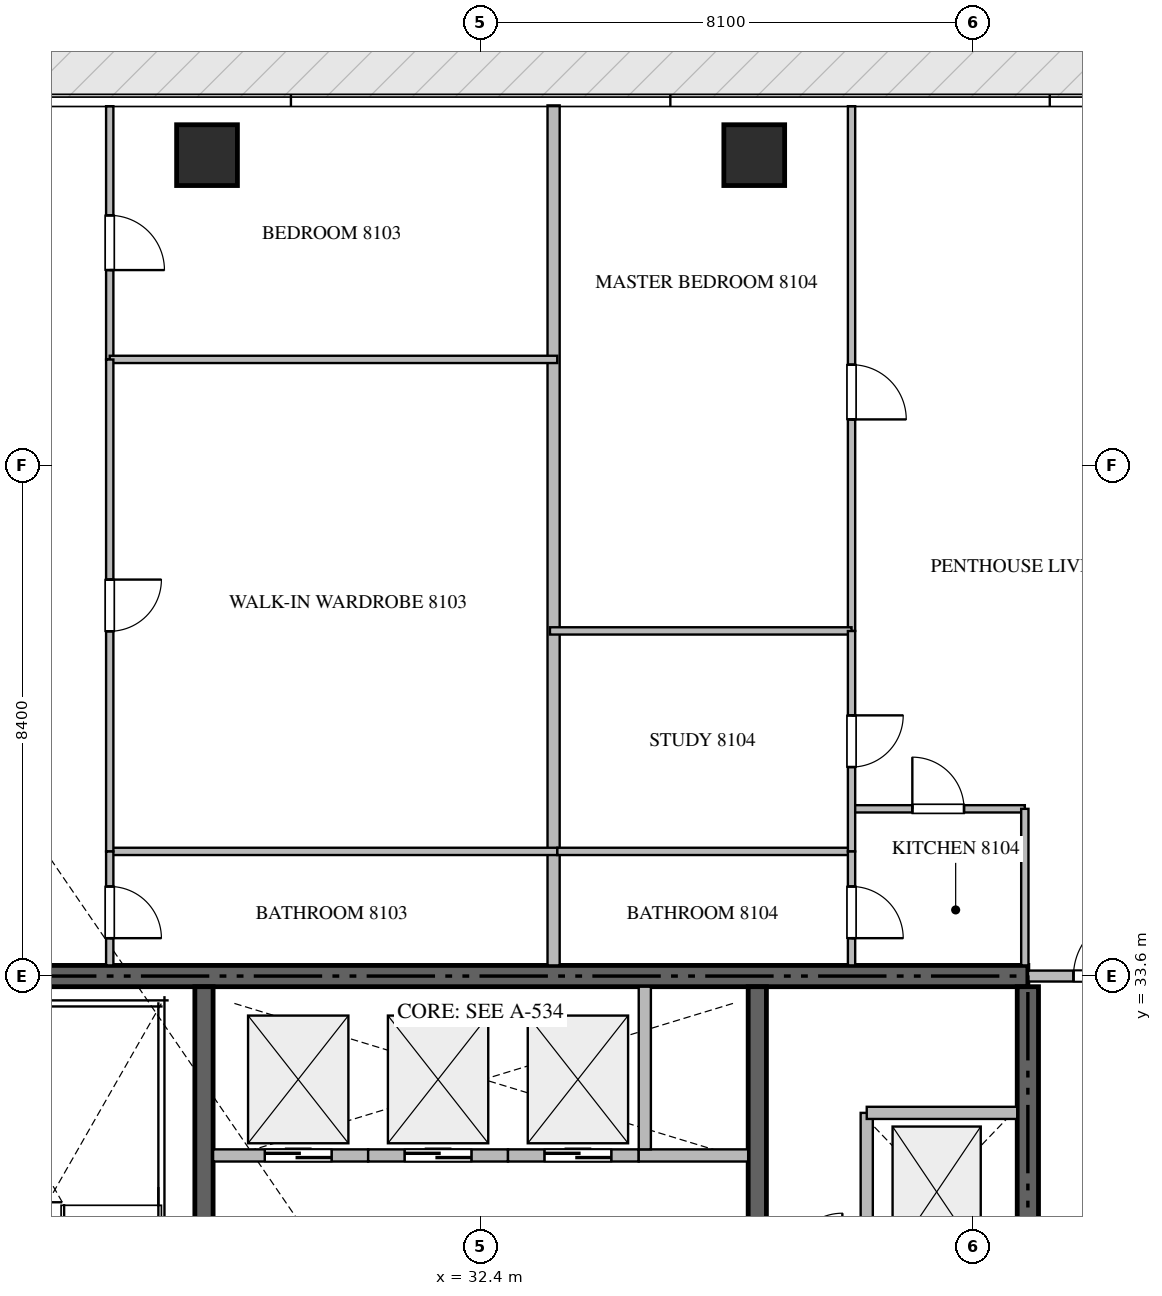
"""IFC4 building model, lengths in metres.
Left out: names, types, materials, properties, quantities, classifications, styles, units other than length and angle.
Written with IfcOpenShell. Run it as: python <this file> out.ifc"""

import sys

from ifc_helpers import new_model, si_unit, direction, frame, frame_2d, origin, origin_2d, place, context, subcontext, project, spatial, rectangle, extrude, source, transform, mapped, element, fill, save


model = new_model("IFC4")
c1 = context("Model", 3, precision=1e-05, world=origin(), true_north=direction((0.0, 1.0)))
c2 = subcontext(c1, "Body", "Model", "MODEL_VIEW")
j1 = project(units=[si_unit("LENGTHUNIT", "METRE"), si_unit("PLANEANGLEUNIT", "RADIAN")], contexts=[c1])
p1 = place(None, origin())
s1 = spatial("IfcSite", under=j1, at=p1, CompositionType="ELEMENT")
p2 = place(p1, origin())
s2 = spatial("IfcBuilding", under=s1, at=p2, CompositionType="ELEMENT")
p3 = place(p2, frame((0.0, 0.0, 325.85)))
s3 = spatial("IfcBuildingStorey", under=s2, at=p3, CompositionType="ELEMENT", Elevation=325.85)
p4 = place(p3, frame((41.4, 33.6, -0.26), z_axis=(0.0, 0.0, 1.0), x_axis=(-1.0, 0.0, 0.0)))
e1 = element("IfcWall", 1, at=p4, inside=s3, PredefinedType="SHEAR", context=c2, shape_type="SweptSolid", body=[
    extrude(rectangle(XDim=18.0, YDim=0.35, at=frame_2d((9.0, 0.0))), origin(), (0.0, 0.0, 1.0), 4.048),
])
p5 = place(p3, frame((41.4, 27.75, -0.26), z_axis=(0.0, 0.0, 1.0), x_axis=(0.0, 1.0, 0.0)))
e2 = element("IfcWall", 2, at=p5, inside=s3, PredefinedType="SHEAR", context=c2, shape_type="SweptSolid", body=[
    extrude(rectangle(XDim=5.675, YDim=0.35, at=frame_2d((2.837, 0.0))), origin(), (0.0, 0.0, 1.0), 4.048),
])
p6 = place(p3, frame((27.85, 23.55, -0.26), z_axis=(0.0, 0.0, 1.0), x_axis=(0.0, 1.0, 0.0)))
e3 = element("IfcWall", 3, at=p6, inside=s3, PredefinedType="SHEAR", context=c2, shape_type="SweptSolid", body=[
    extrude(rectangle(XDim=9.875, YDim=0.3, at=frame_2d((4.938, 0.0))), origin(), (0.0, 0.0, 1.0), 4.048),
])
p7 = place(p3, frame((36.95, 27.05, -0.26), z_axis=(0.0, 0.0, 1.0), x_axis=(0.0, 1.0, 0.0)))
e4 = element("IfcWall", 4, at=p7, inside=s3, PredefinedType="SHEAR", context=c2, shape_type="SweptSolid", body=[
    extrude(rectangle(XDim=6.375, YDim=0.3, at=frame_2d((3.188, 0.0))), origin(), (0.0, 0.0, 1.0), 4.048),
])
m1 = source(origin(), c2, "Body", "SweptSolid", [
    extrude(rectangle(XDim=1.0, YDim=1.0, at=origin_2d()), origin(), (0.0, 0.0, 1.0), 4.05),
])
for number, where, z_axis, x_axis in (
    (5, (27.9, 47.1, -0.26), (0.0, 0.0, 1.0), (1.0, 0.0, 0.0)),
    (6, (36.9, 47.1, -0.26), (0.0, 0.0, 1.0), (1.0, 0.0, 0.0)),
):
    element("IfcColumn", number, at=place(p3, frame(where, z_axis=z_axis, x_axis=x_axis)), inside=s3, PredefinedType="COLUMN", context=c2, shape_type="MappedRepresentation", body=[
        mapped(m1, transform((0.0, 0.0, 0.0), scale=1.0)),
    ])
p8 = place(p3, frame((28.0, 30.65, 0.0), z_axis=(0.0, 0.0, 1.0), x_axis=(1.0, 0.0, 0.0)))
e7 = element("IfcWall", 7, at=p8, inside=s3, PredefinedType="STANDARD", context=c2, shape_type="SweptSolid", body=[
    extrude(rectangle(XDim=2.55, YDim=0.2, at=frame_2d((1.275, 0.0))), origin(), (0.0, 0.0, 1.0), 3.79),
])
p9 = place(p8, frame((0.85, 0.0, 0.0)))
e8 = element("IfcOpeningElement", 8, at=p9, cuts=e7, PredefinedType="OPENING", context=c2, shape_type="SweptSolid", body=[
    extrude(rectangle(XDim=1.1, YDim=2.2, at=frame_2d((0.55, 1.1))), frame((0.0, 0.11, 0.0), z_axis=(0.0, -1.0, 0.0), x_axis=(1.0, 0.0, 0.0)), (0.0, 0.0, 1.0), 0.22),
])
p10 = place(p3, frame((30.55, 30.65, 0.0), z_axis=(0.0, 0.0, 1.0), x_axis=(1.0, 0.0, 0.0)))
e9 = element("IfcWall", 9, at=p10, inside=s3, PredefinedType="STANDARD", context=c2, shape_type="SweptSolid", body=[
    extrude(rectangle(XDim=2.3, YDim=0.2, at=frame_2d((1.15, 0.0))), origin(), (0.0, 0.0, 1.0), 3.79),
])
p11 = place(p10, frame((0.6, 0.0, 0.0)))
e10 = element("IfcOpeningElement", 10, at=p11, cuts=e9, PredefinedType="OPENING", context=c2, shape_type="SweptSolid", body=[
    extrude(rectangle(XDim=1.1, YDim=2.2, at=frame_2d((0.55, 1.1))), frame((0.0, 0.11, 0.0), z_axis=(0.0, -1.0, 0.0), x_axis=(1.0, 0.0, 0.0)), (0.0, 0.0, 1.0), 0.22),
])
p12 = place(p3, frame((32.85, 30.65, 0.0), z_axis=(0.0, 0.0, 1.0), x_axis=(1.0, 0.0, 0.0)))
e11 = element("IfcWall", 11, at=p12, inside=s3, PredefinedType="STANDARD", context=c2, shape_type="SweptSolid", body=[
    extrude(rectangle(XDim=2.15, YDim=0.2, at=frame_2d((1.075, 0.0))), origin(), (0.0, 0.0, 1.0), 3.79),
])
p13 = place(p12, frame((0.6, 0.0, 0.0)))
e12 = element("IfcOpeningElement", 12, at=p13, cuts=e11, PredefinedType="OPENING", context=c2, shape_type="SweptSolid", body=[
    extrude(rectangle(XDim=1.1, YDim=2.2, at=frame_2d((0.55, 1.1))), frame((0.0, 0.11, 0.0), z_axis=(0.0, -1.0, 0.0), x_axis=(1.0, 0.0, 0.0)), (0.0, 0.0, 1.0), 0.22),
])
p14 = place(p3, frame((35.0, 30.65, 0.0), z_axis=(0.0, 0.0, 1.0), x_axis=(1.0, 0.0, 0.0)))
e13 = element("IfcWall", 13, at=p14, inside=s3, PredefinedType="STANDARD", context=c2, shape_type="SweptSolid", body=[
    extrude(rectangle(XDim=1.8, YDim=0.2, at=frame_2d((0.9, 0.0))), origin(), (0.0, 0.0, 1.0), 3.79),
])
p15 = place(p3, frame((35.1, 30.75, 0.0), z_axis=(0.0, 0.0, 1.0), x_axis=(0.0, 1.0, 0.0)))
e14 = element("IfcWall", 14, at=p15, inside=s3, PredefinedType="STANDARD", context=c2, shape_type="SweptSolid", body=[
    extrude(rectangle(XDim=2.675, YDim=0.2, at=frame_2d((1.337, 0.0))), origin(), (0.0, 0.0, 1.0), 3.79),
])
p16 = place(p3, frame((38.75, 28.85, 0.0), z_axis=(0.0, 0.0, 1.0), x_axis=(0.0, 1.0, 0.0)))
e15 = element("IfcWall", 15, at=p16, inside=s3, PredefinedType="STANDARD", context=c2, shape_type="SweptSolid", body=[
    extrude(rectangle(XDim=2.5, YDim=0.2, at=frame_2d((1.25, 0.0))), origin(), (0.0, 0.0, 1.0), 3.79),
])
p17 = place(p3, frame((38.75, 31.35, 0.0), z_axis=(0.0, 0.0, 1.0), x_axis=(1.0, 0.0, 0.0)))
e16 = element("IfcWall", 16, at=p17, inside=s3, PredefinedType="STANDARD", context=c2, shape_type="SweptSolid", body=[
    extrude(rectangle(XDim=2.475, YDim=0.2, at=frame_2d((1.238, 0.0))), origin(), (0.0, 0.0, 1.0), 3.79),
])
p18 = place(p3, frame((33.6, 33.775, 0.0), z_axis=(0.0, 0.0, 1.0), x_axis=(0.0, 1.0, 0.0)))
e17 = element("IfcWall", 17, at=p18, inside=s3, PredefinedType="PARTITIONING", context=c2, shape_type="SweptSolid", body=[
    extrude(rectangle(XDim=14.143, YDim=0.2, at=frame_2d((7.072, 0.0))), origin(), (0.0, 0.0, 1.0), 3.79),
])
p19 = place(p3, frame((41.402, 33.6, 0.0), z_axis=(0.0, 0.0, 1.0), x_axis=(1.0, 0.0, 0.0)))
e18 = element("IfcWall", 18, at=p19, inside=s3, PredefinedType="PARTITIONING", context=c2, shape_type="SweptSolid", body=[
    extrude(rectangle(XDim=2.496, YDim=0.18, at=frame_2d((1.248, 0.0))), origin(), (0.0, 0.0, 1.0), 3.79),
])
p20 = place(p19, frame((0.748, 0.0, 0.0)))
e19 = element("IfcOpeningElement", 19, at=p20, cuts=e18, PredefinedType="OPENING", context=c2, shape_type="SweptSolid", body=[
    extrude(rectangle(XDim=1.0, YDim=2.15, at=frame_2d((0.5, 1.075))), frame((0.0, 0.1, 0.0), z_axis=(0.0, -1.0, 0.0), x_axis=(1.0, 0.0, 0.0)), (0.0, 0.0, 1.0), 0.2),
])
p21 = place(p3, frame((26.3, 47.905, 0.0), z_axis=(0.0, 0.0, 1.0), x_axis=(0.0, -1.0, 0.0)))
e20 = element("IfcWall", 20, at=p21, inside=s3, PredefinedType="PARTITIONING", context=c2, shape_type="SweptSolid", body=[
    extrude(rectangle(XDim=4.164, YDim=0.12, at=frame_2d((2.082, 0.0))), origin(), (0.0, 0.0, 1.0), 3.79),
])
p22 = place(p21, frame((1.795, 0.0, 0.0)))
e21 = element("IfcOpeningElement", 21, at=p22, cuts=e20, PredefinedType="OPENING", context=c2, shape_type="SweptSolid", body=[
    extrude(rectangle(XDim=0.9, YDim=2.1, at=frame_2d((0.45, 1.05))), frame((0.0, 0.07, 0.0), z_axis=(0.0, -1.0, 0.0), x_axis=(1.0, 0.0, 0.0)), (0.0, 0.0, 1.0), 0.14),
])
for number, where, z_axis, x_axis in (
    (22, (26.3, 43.741, 0.0), (0.0, 0.0, 1.0), (1.0, 0.0, 0.0)),
    (23, (26.3, 35.65, 0.0), (0.0, 0.0, 1.0), (1.0, 0.0, 0.0)),
):
    element("IfcWall", number, at=place(p3, frame(where, z_axis=z_axis, x_axis=x_axis)), inside=s3, PredefinedType="PARTITIONING", context=c2, shape_type="SweptSolid", body=[
        extrude(rectangle(XDim=7.36, YDim=0.12, at=frame_2d((3.68, 0.0))), origin(), (0.0, 0.0, 1.0), 3.79),
    ])
p23 = place(p3, frame((26.3, 43.739, 0.0), z_axis=(0.0, 0.0, 1.0), x_axis=(0.0, -1.0, 0.0)))
e24 = element("IfcWall", 24, at=p23, inside=s3, PredefinedType="PARTITIONING", context=c2, shape_type="SweptSolid", body=[
    extrude(rectangle(XDim=8.089, YDim=0.12, at=frame_2d((4.044, 0.0))), origin(), (0.0, 0.0, 1.0), 3.79),
])
p24 = place(p23, frame((3.619, 0.0, 0.0)))
e25 = element("IfcOpeningElement", 25, at=p24, cuts=e24, PredefinedType="OPENING", context=c2, shape_type="SweptSolid", body=[
    extrude(rectangle(XDim=0.85, YDim=2.1, at=frame_2d((0.425, 1.05))), frame((0.0, 0.07, 0.0), z_axis=(0.0, -1.0, 0.0), x_axis=(1.0, 0.0, 0.0)), (0.0, 0.0, 1.0), 0.14),
])
p25 = place(p3, frame((26.3, 35.648, 0.0), z_axis=(0.0, 0.0, 1.0), x_axis=(0.0, -1.0, 0.0)))
e26 = element("IfcWall", 26, at=p25, inside=s3, PredefinedType="PARTITIONING", context=c2, shape_type="SweptSolid", body=[
    extrude(rectangle(XDim=1.873, YDim=0.12, at=frame_2d((0.937, 0.0))), origin(), (0.0, 0.0, 1.0), 3.79),
])
p26 = place(p25, frame((0.575, 0.0, 0.0)))
e27 = element("IfcOpeningElement", 27, at=p26, cuts=e26, PredefinedType="OPENING", context=c2, shape_type="SweptSolid", body=[
    extrude(rectangle(XDim=0.85, YDim=2.1, at=frame_2d((0.425, 1.05))), frame((0.0, 0.07, 0.0), z_axis=(0.0, -1.0, 0.0), x_axis=(1.0, 0.0, 0.0)), (0.0, 0.0, 1.0), 0.14),
])
p27 = place(p3, frame((38.5, 36.35, 0.0), z_axis=(0.0, 0.0, 1.0), x_axis=(1.0, 0.0, 0.0)))
e28 = element("IfcWall", 28, at=p27, inside=s3, PredefinedType="PARTITIONING", context=c2, shape_type="SweptSolid", body=[
    extrude(rectangle(XDim=2.85, YDim=0.12, at=frame_2d((1.425, 0.0))), origin(), (0.0, 0.0, 1.0), 3.512),
])
p28 = place(p27, frame((1.0, 0.0, 0.0)))
e29 = element("IfcOpeningElement", 29, at=p28, cuts=e28, PredefinedType="OPENING", context=c2, shape_type="SweptSolid", body=[
    extrude(rectangle(XDim=0.85, YDim=2.1, at=frame_2d((0.425, 1.05))), frame((0.0, 0.07, 0.0), z_axis=(0.0, -1.0, 0.0), x_axis=(1.0, 0.0, 0.0)), (0.0, 0.0, 1.0), 0.14),
])
p29 = place(p3, frame((41.35, 36.35, 0.0), z_axis=(0.0, 0.0, 1.0), x_axis=(0.0, -1.0, 0.0)))
e30 = element("IfcWall", 30, at=p29, inside=s3, PredefinedType="PARTITIONING", context=c2, shape_type="SweptSolid", body=[
    extrude(rectangle(XDim=2.575, YDim=0.12, at=frame_2d((1.288, 0.0))), origin(), (0.0, 0.0, 1.0), 3.79),
])
p30 = place(p3, frame((38.5, 47.905, 0.0), z_axis=(0.0, 0.0, 1.0), x_axis=(0.0, -1.0, 0.0)))
e31 = element("IfcWall", 31, at=p30, inside=s3, PredefinedType="PARTITIONING", context=c2, shape_type="SweptSolid", body=[
    extrude(rectangle(XDim=8.629, YDim=0.12, at=frame_2d((4.314, 0.0))), origin(), (0.0, 0.0, 1.0), 3.79),
])
p31 = place(p30, frame((4.251, 0.0, 0.0)))
e32 = element("IfcOpeningElement", 32, at=p31, cuts=e31, PredefinedType="OPENING", context=c2, shape_type="SweptSolid", body=[
    extrude(rectangle(XDim=0.9, YDim=2.1, at=frame_2d((0.45, 1.05))), frame((0.0, 0.07, 0.0), z_axis=(0.0, -1.0, 0.0), x_axis=(1.0, 0.0, 0.0)), (0.0, 0.0, 1.0), 0.14),
])
p32 = place(p3, frame((33.54, 39.276, 0.0), z_axis=(0.0, 0.0, 1.0), x_axis=(1.0, 0.0, 0.0)))
e33 = element("IfcWall", 33, at=p32, inside=s3, PredefinedType="PARTITIONING", context=c2, shape_type="SweptSolid", body=[
    extrude(rectangle(XDim=4.96, YDim=0.12, at=frame_2d((2.48, 0.0))), origin(), (0.0, 0.0, 1.0), 3.79),
])
p33 = place(p3, frame((33.662, 35.65, 0.0), z_axis=(0.0, 0.0, 1.0), x_axis=(1.0, 0.0, 0.0)))
e34 = element("IfcWall", 34, at=p33, inside=s3, PredefinedType="PARTITIONING", context=c2, shape_type="SweptSolid", body=[
    extrude(rectangle(XDim=4.838, YDim=0.12, at=frame_2d((2.419, 0.0))), origin(), (0.0, 0.0, 1.0), 3.79),
])
p34 = place(p3, frame((38.5, 39.274, 0.0), z_axis=(0.0, 0.0, 1.0), x_axis=(0.0, -1.0, 0.0)))
e35 = element("IfcWall", 35, at=p34, inside=s3, PredefinedType="PARTITIONING", context=c2, shape_type="SweptSolid", body=[
    extrude(rectangle(XDim=3.624, YDim=0.12, at=frame_2d((1.812, 0.0))), origin(), (0.0, 0.0, 1.0), 3.79),
])
p35 = place(p34, frame((1.387, 0.0, 0.0)))
e36 = element("IfcOpeningElement", 36, at=p35, cuts=e35, PredefinedType="OPENING", context=c2, shape_type="SweptSolid", body=[
    extrude(rectangle(XDim=0.85, YDim=2.1, at=frame_2d((0.425, 1.05))), frame((0.0, 0.07, 0.0), z_axis=(0.0, -1.0, 0.0), x_axis=(1.0, 0.0, 0.0)), (0.0, 0.0, 1.0), 0.14),
])
p36 = place(p3, frame((38.5, 35.648, 0.0), z_axis=(0.0, 0.0, 1.0), x_axis=(0.0, -1.0, 0.0)))
e37 = element("IfcWall", 37, at=p36, inside=s3, PredefinedType="PARTITIONING", context=c2, shape_type="SweptSolid", body=[
    extrude(rectangle(XDim=1.873, YDim=0.12, at=frame_2d((0.937, 0.0))), origin(), (0.0, 0.0, 1.0), 3.79),
])
p37 = place(p36, frame((0.575, 0.0, 0.0)))
e38 = element("IfcOpeningElement", 38, at=p37, cuts=e37, PredefinedType="OPENING", context=c2, shape_type="SweptSolid", body=[
    extrude(rectangle(XDim=0.85, YDim=2.1, at=frame_2d((0.425, 1.05))), frame((0.0, 0.07, 0.0), z_axis=(0.0, -1.0, 0.0), x_axis=(1.0, 0.0, 0.0)), (0.0, 0.0, 1.0), 0.14),
])
m2 = source(origin(), c2, "Body", "SweptSolid", [
    extrude(rectangle(XDim=1.1, YDim=2.2, at=frame_2d((0.55, 1.1))), frame((0.0, 0.025, 0.0), z_axis=(0.0, -1.0, 0.0), x_axis=(1.0, 0.0, 0.0)), (0.0, 0.0, 1.0), 0.05),
])
p38 = place(p9, origin())
e39 = element("IfcDoor", 39, at=p38, inside=s3, OperationType="DOUBLE_DOOR_SLIDING", PredefinedType="DOOR", context=c2, shape_type="MappedRepresentation", body=[
    mapped(m2, transform((0.0, 0.0, 0.0), scale=1.0)),
])
fill(e8, e39)
p39 = place(p11, origin())
e40 = element("IfcDoor", 40, at=p39, inside=s3, OperationType="DOUBLE_DOOR_SLIDING", PredefinedType="DOOR", context=c2, shape_type="MappedRepresentation", body=[
    mapped(m2, transform((0.0, 0.0, 0.0), scale=1.0)),
])
fill(e10, e40)
p40 = place(p13, origin())
e41 = element("IfcDoor", 41, at=p40, inside=s3, OperationType="DOUBLE_DOOR_SLIDING", PredefinedType="DOOR", context=c2, shape_type="MappedRepresentation", body=[
    mapped(m2, transform((0.0, 0.0, 0.0), scale=1.0)),
])
fill(e12, e41)
m3 = source(origin(), c2, "Body", "SweptSolid", [
    extrude(rectangle(XDim=1.0, YDim=2.15, at=frame_2d((0.5, 1.075))), frame((0.0, 0.025, 0.0), z_axis=(0.0, -1.0, 0.0), x_axis=(1.0, 0.0, 0.0)), (0.0, 0.0, 1.0), 0.05),
])
p41 = place(p20, origin())
e42 = element("IfcDoor", 42, at=p41, inside=s3, OperationType="SINGLE_SWING_RIGHT", PredefinedType="DOOR", context=c2, shape_type="MappedRepresentation", body=[
    mapped(m3, transform((0.0, 0.0, 0.0), scale=1.0)),
])
fill(e19, e42)
m4 = source(origin(), c2, "Body", "SweptSolid", [
    extrude(rectangle(XDim=0.9, YDim=2.1, at=frame_2d((0.45, 1.05))), frame((0.0, 0.025, 0.0), z_axis=(0.0, -1.0, 0.0), x_axis=(1.0, 0.0, 0.0)), (0.0, 0.0, 1.0), 0.05),
])
p42 = place(p22, origin())
e43 = element("IfcDoor", 43, at=p42, inside=s3, OperationType="SINGLE_SWING_RIGHT", PredefinedType="DOOR", context=c2, shape_type="MappedRepresentation", body=[
    mapped(m4, transform((0.0, 0.0, 0.0), scale=1.0)),
])
fill(e21, e43)
m5 = source(origin(), c2, "Body", "SweptSolid", [
    extrude(rectangle(XDim=0.85, YDim=2.1, at=frame_2d((0.425, 1.05))), frame((0.0, 0.025, 0.0), z_axis=(0.0, -1.0, 0.0), x_axis=(1.0, 0.0, 0.0)), (0.0, 0.0, 1.0), 0.05),
])
p43 = place(p24, origin())
e44 = element("IfcDoor", 44, at=p43, inside=s3, OperationType="SINGLE_SWING_LEFT", PredefinedType="DOOR", context=c2, shape_type="MappedRepresentation", body=[
    mapped(m5, transform((0.0, 0.0, 0.0), scale=1.0)),
])
fill(e25, e44)
p44 = place(p26, origin())
e45 = element("IfcDoor", 45, at=p44, inside=s3, OperationType="SINGLE_SWING_RIGHT", PredefinedType="DOOR", context=c2, shape_type="MappedRepresentation", body=[
    mapped(m5, transform((0.0, 0.0, 0.0), scale=1.0)),
])
fill(e27, e45)
p45 = place(p28, origin())
e46 = element("IfcDoor", 46, at=p45, inside=s3, OperationType="SINGLE_SWING_LEFT", PredefinedType="DOOR", context=c2, shape_type="MappedRepresentation", body=[
    mapped(m5, transform((0.0, 0.0, 0.0), scale=1.0)),
])
fill(e29, e46)
p46 = place(p31, origin())
e47 = element("IfcDoor", 47, at=p46, inside=s3, OperationType="SINGLE_SWING_RIGHT", PredefinedType="DOOR", context=c2, shape_type="MappedRepresentation", body=[
    mapped(m4, transform((0.0, 0.0, 0.0), scale=1.0)),
])
fill(e32, e47)
p47 = place(p35, origin())
e48 = element("IfcDoor", 48, at=p47, inside=s3, OperationType="SINGLE_SWING_LEFT", PredefinedType="DOOR", context=c2, shape_type="MappedRepresentation", body=[
    mapped(m5, transform((0.0, 0.0, 0.0), scale=1.0)),
])
fill(e36, e48)
p48 = place(p37, origin())
e49 = element("IfcDoor", 49, at=p48, inside=s3, OperationType="SINGLE_SWING_RIGHT", PredefinedType="DOOR", context=c2, shape_type="MappedRepresentation", body=[
    mapped(m5, transform((0.0, 0.0, 0.0), scale=1.0)),
])
fill(e38, e49)
save(model, sys.argv[1])
